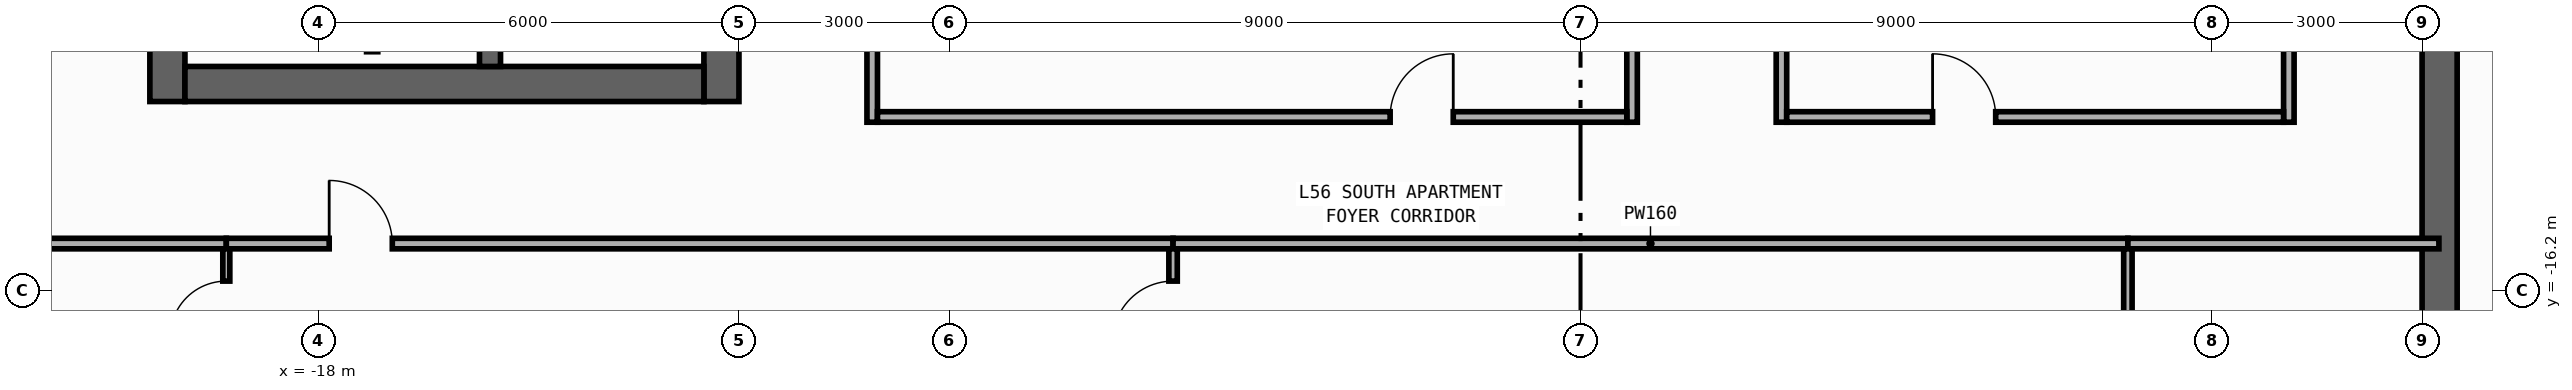
"""IFC4 building model, lengths in metres.
Left out: names, types, materials, properties, quantities, classifications, styles, units other than length and angle.
Written with IfcOpenShell. Run it as: python <this file> out.ifc"""

import sys

from ifc_helpers import new_model, si_unit, direction, frame, frame_2d, origin, place, context, subcontext, project, spatial, rectangle, extrude, element, fill, save


model = new_model("IFC4")
c1 = context("Model", 3, precision=1e-05, world=origin(), true_north=direction((0.0, 1.0)))
c2 = subcontext(c1, "Body", "Model", "MODEL_VIEW")
j1 = project(units=[si_unit("LENGTHUNIT", "METRE"), si_unit("PLANEANGLEUNIT", "RADIAN")], contexts=[c1])
p1 = place(None, origin())
s1 = spatial("IfcSite", under=j1, at=p1, CompositionType="ELEMENT")
p2 = place(p1, origin())
s2 = spatial("IfcBuilding", under=s1, at=p2, CompositionType="ELEMENT")
p3 = place(p2, frame((0.0, 0.0, 240.4)))
s3 = spatial("IfcBuildingStorey", under=s2, at=p3, CompositionType="ELEMENT", Elevation=240.4)
p4 = place(p3, frame((-20.15, -13.5, 0.0), z_axis=(0.0, 0.0, 1.0), x_axis=(0.0, 1.0, 0.0)))
e1 = element("IfcWall", 1, at=p4, inside=s3, PredefinedType="SHEAR", context=c2, shape_type="SweptSolid", body=[
    extrude(rectangle(XDim=27.0, YDim=0.5, at=frame_2d((13.5, 0.0))), origin(), (0.0, 0.0, 1.0), 3.34),
])
p5 = place(p3, frame((-12.25, -13.5, 0.0), z_axis=(0.0, 0.0, 1.0), x_axis=(0.0, 1.0, 0.0)))
e2 = element("IfcWall", 2, at=p5, inside=s3, PredefinedType="SHEAR", context=c2, shape_type="SweptSolid", body=[
    extrude(rectangle(XDim=27.0, YDim=0.5, at=frame_2d((13.5, 0.0))), origin(), (0.0, 0.0, 1.0), 3.34),
])
p6 = place(p5, frame((15.175, 0.0, 0.0)))
e3 = element("IfcOpeningElement", 3, at=p6, cuts=e2, PredefinedType="OPENING", context=c2, shape_type="SweptSolid", body=[
    extrude(rectangle(XDim=0.85, YDim=2.1, at=frame_2d((0.425, 1.05))), frame((0.0, 0.26, 0.0), z_axis=(0.0, -1.0, 0.0), x_axis=(1.0, 0.0, 0.0)), (0.0, 0.0, 1.0), 0.52),
])
p7 = place(p5, frame((21.275, 0.0, 0.0)))
e4 = element("IfcOpeningElement", 4, at=p7, cuts=e2, PredefinedType="OPENING", context=c2, shape_type="SweptSolid", body=[
    extrude(rectangle(XDim=0.85, YDim=2.1, at=frame_2d((0.425, 1.05))), frame((0.0, 0.26, 0.0), z_axis=(0.0, -1.0, 0.0), x_axis=(1.0, 0.0, 0.0)), (0.0, 0.0, 1.0), 0.52),
])
p8 = place(p5, frame((4.275, 0.0, 0.0)))
e5 = element("IfcOpeningElement", 5, at=p8, cuts=e2, PredefinedType="OPENING", context=c2, shape_type="SweptSolid", body=[
    extrude(rectangle(XDim=0.85, YDim=2.1, at=frame_2d((0.425, 1.05))), frame((0.0, 0.26, 0.0), z_axis=(0.0, -1.0, 0.0), x_axis=(1.0, 0.0, 0.0)), (0.0, 0.0, 1.0), 0.52),
])
p9 = place(p5, frame((10.275, 0.0, 0.0)))
e6 = element("IfcOpeningElement", 6, at=p9, cuts=e2, PredefinedType="OPENING", context=c2, shape_type="SweptSolid", body=[
    extrude(rectangle(XDim=0.85, YDim=2.1, at=frame_2d((0.425, 1.05))), frame((0.0, 0.26, 0.0), z_axis=(0.0, -1.0, 0.0), x_axis=(1.0, 0.0, 0.0)), (0.0, 0.0, 1.0), 0.52),
])
p10 = place(p5, frame((12.725, 0.0, 0.0)))
e7 = element("IfcOpeningElement", 7, at=p10, cuts=e2, PredefinedType="OPENING", context=c2, shape_type="SweptSolid", body=[
    extrude(rectangle(XDim=1.15, YDim=2.2, at=frame_2d((0.575, 1.1))), frame((0.0, 0.26, 0.0), z_axis=(0.0, -1.0, 0.0), x_axis=(1.0, 0.0, 0.0)), (0.0, 0.0, 1.0), 0.52),
])
p11 = place(p5, frame((1.625, 0.0, 0.0)))
e8 = element("IfcOpeningElement", 8, at=p11, cuts=e2, PredefinedType="OPENING", context=c2, shape_type="SweptSolid", body=[
    extrude(rectangle(XDim=0.85, YDim=2.1, at=frame_2d((0.425, 1.05))), frame((0.0, 0.26, 0.0), z_axis=(0.0, -1.0, 0.0), x_axis=(1.0, 0.0, 0.0)), (0.0, 0.0, 1.0), 0.52),
])
p12 = place(p3, frame((-19.9, -13.25, 0.0), z_axis=(0.0, 0.0, 1.0), x_axis=(1.0, 0.0, 0.0)))
e9 = element("IfcWall", 9, at=p12, inside=s3, PredefinedType="SHEAR", context=c2, shape_type="SweptSolid", body=[
    extrude(rectangle(XDim=7.4, YDim=0.5, at=frame_2d((3.7, 0.0))), origin(), (0.0, 0.0, 1.0), 3.34),
])
p13 = place(p3, frame((-15.55, -13.0, 0.0), z_axis=(0.0, 0.0, 1.0), x_axis=(0.0, 1.0, 0.0)))
e10 = element("IfcWall", 10, at=p13, inside=s3, PredefinedType="SHEAR", context=c2, shape_type="SweptSolid", body=[
    extrude(rectangle(XDim=26.0, YDim=0.3, at=frame_2d((13.0, 0.0))), origin(), (0.0, 0.0, 1.0), 3.34),
])
p14 = place(p13, frame((12.225, 0.0, 0.0)))
e11 = element("IfcOpeningElement", 11, at=p14, cuts=e10, PredefinedType="OPENING", context=c2, shape_type="SweptSolid", body=[
    extrude(rectangle(XDim=1.15, YDim=2.2, at=frame_2d((0.575, 1.1))), frame((0.0, 0.16, 0.0), z_axis=(0.0, -1.0, 0.0), x_axis=(1.0, 0.0, 0.0)), (0.0, 0.0, 1.0), 0.32),
])
p15 = place(p13, frame((1.125, 0.0, 0.0)))
e12 = element("IfcOpeningElement", 12, at=p15, cuts=e10, PredefinedType="OPENING", context=c2, shape_type="SweptSolid", body=[
    extrude(rectangle(XDim=0.85, YDim=2.1, at=frame_2d((0.425, 1.05))), frame((0.0, 0.16, 0.0), z_axis=(0.0, -1.0, 0.0), x_axis=(1.0, 0.0, 0.0)), (0.0, 0.0, 1.0), 0.32),
])
p16 = place(p3, frame((12.25, -19.8, 0.0), z_axis=(0.0, 0.0, 1.0), x_axis=(0.0, 1.0, 0.0)))
e13 = element("IfcWall", 13, at=p16, inside=s3, PredefinedType="SHEAR", context=c2, shape_type="SweptSolid", body=[
    extrude(rectangle(XDim=27.0, YDim=0.5, at=frame_2d((13.5, 0.0))), origin(), (0.0, 0.0, 1.0), 3.34),
])
p17 = place(p16, frame((23.05, 0.0, 0.0)))
e14 = element("IfcOpeningElement", 14, at=p17, cuts=e13, PredefinedType="OPENING", context=c2, shape_type="SweptSolid", body=[
    extrude(rectangle(XDim=1.1, YDim=2.2, at=frame_2d((0.55, 1.1))), frame((0.0, 0.26, 0.0), z_axis=(0.0, -1.0, 0.0), x_axis=(1.0, 0.0, 0.0)), (0.0, 0.0, 1.0), 0.52),
])
p18 = place(p16, frame((19.85, 0.0, 0.0)))
e15 = element("IfcOpeningElement", 15, at=p18, cuts=e13, PredefinedType="OPENING", context=c2, shape_type="SweptSolid", body=[
    extrude(rectangle(XDim=1.1, YDim=2.2, at=frame_2d((0.55, 1.1))), frame((0.0, 0.26, 0.0), z_axis=(0.0, -1.0, 0.0), x_axis=(1.0, 0.0, 0.0)), (0.0, 0.0, 1.0), 0.52),
])
p19 = place(p16, frame((16.65, 0.0, 0.0)))
e16 = element("IfcOpeningElement", 16, at=p19, cuts=e13, PredefinedType="OPENING", context=c2, shape_type="SweptSolid", body=[
    extrude(rectangle(XDim=1.1, YDim=2.2, at=frame_2d((0.55, 1.1))), frame((0.0, 0.26, 0.0), z_axis=(0.0, -1.0, 0.0), x_axis=(1.0, 0.0, 0.0)), (0.0, 0.0, 1.0), 0.52),
])
p20 = place(p16, frame((7.175, 0.0, 0.0)))
e17 = element("IfcOpeningElement", 17, at=p20, cuts=e13, PredefinedType="OPENING", context=c2, shape_type="SweptSolid", body=[
    extrude(rectangle(XDim=0.85, YDim=2.1, at=frame_2d((0.425, 1.05))), frame((0.0, 0.26, 0.0), z_axis=(0.0, -1.0, 0.0), x_axis=(1.0, 0.0, 0.0)), (0.0, 0.0, 1.0), 0.52),
])
p21 = place(p16, frame((10.375, 0.0, 0.0)))
e18 = element("IfcOpeningElement", 18, at=p21, cuts=e13, PredefinedType="OPENING", context=c2, shape_type="SweptSolid", body=[
    extrude(rectangle(XDim=0.85, YDim=2.1, at=frame_2d((0.425, 1.05))), frame((0.0, 0.26, 0.0), z_axis=(0.0, -1.0, 0.0), x_axis=(1.0, 0.0, 0.0)), (0.0, 0.0, 1.0), 0.52),
])
p22 = place(p16, frame((12.725, 0.0, 0.0)))
e19 = element("IfcOpeningElement", 19, at=p22, cuts=e13, PredefinedType="OPENING", context=c2, shape_type="SweptSolid", body=[
    extrude(rectangle(XDim=1.15, YDim=2.2, at=frame_2d((0.575, 1.1))), frame((0.0, 0.26, 0.0), z_axis=(0.0, -1.0, 0.0), x_axis=(1.0, 0.0, 0.0)), (0.0, 0.0, 1.0), 0.52),
])
p23 = place(p16, frame((25.125, 0.0, 0.0)))
e20 = element("IfcOpeningElement", 20, at=p23, cuts=e13, PredefinedType="OPENING", context=c2, shape_type="SweptSolid", body=[
    extrude(rectangle(XDim=0.85, YDim=2.1, at=frame_2d((0.425, 1.05))), frame((0.0, 0.26, 0.0), z_axis=(0.0, -1.0, 0.0), x_axis=(1.0, 0.0, 0.0)), (0.0, 0.0, 1.0), 0.52),
])
p24 = place(p3, frame((-10.1, -13.795, 0.0), z_axis=(0.0, 0.0, 1.0), x_axis=(0.0, 1.0, 0.0)))
e21 = element("IfcWall", 21, at=p24, inside=s3, PredefinedType="PARTITIONING", context=c2, shape_type="SweptSolid", body=[
    extrude(rectangle(XDim=14.205, YDim=0.15, at=frame_2d((7.103, 0.0))), origin(), (0.0, 0.0, 1.0), 3.34),
])
p25 = place(p24, frame((7.972, 0.0, 0.0)))
e22 = element("IfcOpeningElement", 22, at=p25, cuts=e21, PredefinedType="OPENING", context=c2, shape_type="SweptSolid", body=[
    extrude(rectangle(XDim=0.9, YDim=2.15, at=frame_2d((0.45, 1.075))), frame((0.0, 0.085, 0.0), z_axis=(0.0, -1.0, 0.0), x_axis=(1.0, 0.0, 0.0)), (0.0, 0.0, 1.0), 0.17),
])
p26 = place(p3, frame((10.1, -13.795, 0.0), z_axis=(0.0, 0.0, 1.0), x_axis=(0.0, 1.0, 0.0)))
e23 = element("IfcWall", 23, at=p26, inside=s3, PredefinedType="PARTITIONING", context=c2, shape_type="SweptSolid", body=[
    extrude(rectangle(XDim=11.575, YDim=0.15, at=frame_2d((5.788, 0.0))), origin(), (0.0, 0.0, 1.0), 3.34),
])
p27 = place(p26, frame((7.979, 0.0, 0.0)))
e24 = element("IfcOpeningElement", 24, at=p27, cuts=e23, PredefinedType="OPENING", context=c2, shape_type="SweptSolid", body=[
    extrude(rectangle(XDim=0.9, YDim=2.15, at=frame_2d((0.45, 1.075))), frame((0.0, 0.085, 0.0), z_axis=(0.0, -1.0, 0.0), x_axis=(1.0, 0.0, 0.0)), (0.0, 0.0, 1.0), 0.17),
])
p28 = place(p3, frame((0.735, -13.795, 0.0), z_axis=(0.0, 0.0, 1.0), x_axis=(0.0, 1.0, 0.0)))
e25 = element("IfcWall", 25, at=p28, inside=s3, PredefinedType="PARTITIONING", context=c2, shape_type="SweptSolid", body=[
    extrude(rectangle(XDim=14.055, YDim=0.15, at=frame_2d((7.027, 0.0))), origin(), (0.0, 0.0, 1.0), 3.34),
])
p29 = place(p28, frame((7.881, 0.0, 0.0)))
e26 = element("IfcOpeningElement", 26, at=p29, cuts=e25, PredefinedType="OPENING", context=c2, shape_type="SweptSolid", body=[
    extrude(rectangle(XDim=0.9, YDim=2.15, at=frame_2d((0.45, 1.075))), frame((0.0, 0.085, 0.0), z_axis=(0.0, -1.0, 0.0), x_axis=(1.0, 0.0, 0.0)), (0.0, 0.0, 1.0), 0.17),
])
p30 = place(p3, frame((2.865, -13.795, 0.0), z_axis=(0.0, 0.0, 1.0), x_axis=(0.0, 1.0, 0.0)))
e27 = element("IfcWall", 27, at=p30, inside=s3, PredefinedType="PARTITIONING", context=c2, shape_type="SweptSolid", body=[
    extrude(rectangle(XDim=11.415, YDim=0.15, at=frame_2d((5.708, 0.0))), origin(), (0.0, 0.0, 1.0), 3.34),
])
p31 = place(p30, frame((8.013, 0.0, 0.0)))
e28 = element("IfcOpeningElement", 28, at=p31, cuts=e27, PredefinedType="OPENING", context=c2, shape_type="SweptSolid", body=[
    extrude(rectangle(XDim=0.9, YDim=2.15, at=frame_2d((0.45, 1.075))), frame((0.0, 0.085, 0.0), z_axis=(0.0, -1.0, 0.0), x_axis=(1.0, 0.0, 0.0)), (0.0, 0.0, 1.0), 0.17),
])
p32 = place(p3, frame((-21.955, -15.525, 0.0), z_axis=(0.0, 0.0, 1.0), x_axis=(1.0, 0.0, 0.0)))
e29 = element("IfcWall", 29, at=p32, inside=s3, PredefinedType="PARTITIONING", context=c2, shape_type="SweptSolid", body=[
    extrude(rectangle(XDim=2.645, YDim=0.15, at=frame_2d((1.323, 0.0))), origin(), (0.0, 0.0, 1.0), 3.34),
])
p33 = place(p3, frame((-19.31, -15.525, 0.0), z_axis=(0.0, 0.0, 1.0), x_axis=(1.0, 0.0, 0.0)))
e30 = element("IfcWall", 30, at=p33, inside=s3, PredefinedType="PARTITIONING", context=c2, shape_type="SweptSolid", body=[
    extrude(rectangle(XDim=13.5, YDim=0.15, at=frame_2d((6.75, 0.0))), origin(), (0.0, 0.0, 1.0), 3.34),
])
p34 = place(p33, frame((1.467, 0.0, 0.0)))
e31 = element("IfcOpeningElement", 31, at=p34, cuts=e30, PredefinedType="OPENING", context=c2, shape_type="SweptSolid", body=[
    extrude(rectangle(XDim=0.9, YDim=2.15, at=frame_2d((0.45, 1.075))), frame((0.0, 0.085, 0.0), z_axis=(0.0, -1.0, 0.0), x_axis=(1.0, 0.0, 0.0)), (0.0, 0.0, 1.0), 0.17),
])
p35 = place(p3, frame((-5.81, -15.525, 0.0), z_axis=(0.0, 0.0, 1.0), x_axis=(1.0, 0.0, 0.0)))
e32 = element("IfcWall", 32, at=p35, inside=s3, PredefinedType="PARTITIONING", context=c2, shape_type="SweptSolid", body=[
    extrude(rectangle(XDim=13.615, YDim=0.15, at=frame_2d((6.808, 0.0))), origin(), (0.0, 0.0, 1.0), 3.34),
])
p36 = place(p3, frame((7.805, -15.525, 0.0), z_axis=(0.0, 0.0, 1.0), x_axis=(1.0, 0.0, 0.0)))
e33 = element("IfcWall", 33, at=p36, inside=s3, PredefinedType="PARTITIONING", context=c2, shape_type="SweptSolid", body=[
    extrude(rectangle(XDim=4.435, YDim=0.15, at=frame_2d((2.218, 0.0))), origin(), (0.0, 0.0, 1.0), 3.34),
])
p37 = place(p3, frame((-10.025, -13.72, 0.0), z_axis=(0.0, 0.0, 1.0), x_axis=(1.0, 0.0, 0.0)))
e34 = element("IfcWall", 34, at=p37, inside=s3, PredefinedType="PARTITIONING", context=c2, shape_type="SweptSolid", body=[
    extrude(rectangle(XDim=10.685, YDim=0.15, at=frame_2d((5.342, 0.0))), origin(), (0.0, 0.0, 1.0), 3.34),
])
p38 = place(p37, frame((7.31, 0.0, 0.0)))
e35 = element("IfcOpeningElement", 35, at=p38, cuts=e34, PredefinedType="OPENING", context=c2, shape_type="SweptSolid", body=[
    extrude(rectangle(XDim=0.9, YDim=2.15, at=frame_2d((0.45, 1.075))), frame((0.0, 0.085, 0.0), z_axis=(0.0, -1.0, 0.0), x_axis=(1.0, 0.0, 0.0)), (0.0, 0.0, 1.0), 0.17),
])
p39 = place(p3, frame((2.94, -13.72, 0.0), z_axis=(0.0, 0.0, 1.0), x_axis=(1.0, 0.0, 0.0)))
e36 = element("IfcWall", 36, at=p39, inside=s3, PredefinedType="PARTITIONING", context=c2, shape_type="SweptSolid", body=[
    extrude(rectangle(XDim=7.085, YDim=0.15, at=frame_2d((3.542, 0.0))), origin(), (0.0, 0.0, 1.0), 3.34),
])
p40 = place(p39, frame((2.08, 0.0, 0.0)))
e37 = element("IfcOpeningElement", 37, at=p40, cuts=e36, PredefinedType="OPENING", context=c2, shape_type="SweptSolid", body=[
    extrude(rectangle(XDim=0.9, YDim=2.15, at=frame_2d((0.45, 1.075))), frame((0.0, 0.085, 0.0), z_axis=(0.0, -1.0, 0.0), x_axis=(1.0, 0.0, 0.0)), (0.0, 0.0, 1.0), 0.17),
])
p41 = place(p3, frame((-19.31, -18.1, 0.0), z_axis=(0.0, 0.0, 1.0), x_axis=(0.0, 1.0, 0.0)))
e38 = element("IfcWall", 38, at=p41, inside=s3, PredefinedType="PARTITIONING", context=c2, shape_type="SweptSolid", body=[
    extrude(rectangle(XDim=2.5, YDim=0.1, at=frame_2d((1.25, 0.0))), origin(), (0.0, 0.0, 1.0), 3.34),
])
p42 = place(p41, frame((1.24, 0.0, 0.0)))
e39 = element("IfcOpeningElement", 39, at=p42, cuts=e38, PredefinedType="OPENING", context=c2, shape_type="SweptSolid", body=[
    extrude(rectangle(XDim=0.8, YDim=2.1, at=frame_2d((0.4, 1.05))), frame((0.0, 0.06, 0.0), z_axis=(0.0, -1.0, 0.0), x_axis=(1.0, 0.0, 0.0)), (0.0, 0.0, 1.0), 0.12),
])
p43 = place(p3, frame((-5.81, -20.1, 0.0), z_axis=(0.0, 0.0, 1.0), x_axis=(0.0, 1.0, 0.0)))
e40 = element("IfcWall", 40, at=p43, inside=s3, PredefinedType="PARTITIONING", context=c2, shape_type="SweptSolid", body=[
    extrude(rectangle(XDim=4.5, YDim=0.12, at=frame_2d((2.25, 0.0))), origin(), (0.0, 0.0, 1.0), 3.34),
])
p44 = place(p43, frame((3.18, 0.0, 0.0)))
e41 = element("IfcOpeningElement", 41, at=p44, cuts=e40, PredefinedType="OPENING", context=c2, shape_type="SweptSolid", body=[
    extrude(rectangle(XDim=0.86, YDim=2.15, at=frame_2d((0.43, 1.075))), frame((0.0, 0.07, 0.0), z_axis=(0.0, -1.0, 0.0), x_axis=(1.0, 0.0, 0.0)), (0.0, 0.0, 1.0), 0.14),
])
p45 = place(p3, frame((7.805, -24.735, 0.0), z_axis=(0.0, 0.0, 1.0), x_axis=(0.0, 1.0, 0.0)))
e42 = element("IfcWall", 42, at=p45, inside=s3, PredefinedType="PARTITIONING", context=c2, shape_type="SweptSolid", body=[
    extrude(rectangle(XDim=9.135, YDim=0.12, at=frame_2d((4.568, 0.0))), origin(), (0.0, 0.0, 1.0), 3.34),
])
p46 = place(p45, frame((0.46, 0.0, 0.0)))
e43 = element("IfcOpeningElement", 43, at=p46, cuts=e42, PredefinedType="OPENING", context=c2, shape_type="SweptSolid", body=[
    extrude(rectangle(XDim=0.8, YDim=2.1, at=frame_2d((0.4, 1.05))), frame((0.0, 0.07, 0.0), z_axis=(0.0, -1.0, 0.0), x_axis=(1.0, 0.0, 0.0)), (0.0, 0.0, 1.0), 0.14),
])
p47 = place(p34, origin())
e44 = element("IfcDoor", 44, at=p47, inside=s3, OperationType="SINGLE_SWING_LEFT", PredefinedType="DOOR", context=c2, shape_type="SweptSolid", body=[
    extrude(rectangle(XDim=0.9, YDim=2.15, at=frame_2d((0.45, 1.075))), frame((0.0, 0.025, 0.0), z_axis=(0.0, -1.0, 0.0), x_axis=(1.0, 0.0, 0.0)), (0.0, 0.0, 1.0), 0.05),
])
fill(e31, e44)
p48 = place(p38, origin())
e45 = element("IfcDoor", 45, at=p48, inside=s3, OperationType="SINGLE_SWING_RIGHT", PredefinedType="DOOR", context=c2, shape_type="SweptSolid", body=[
    extrude(rectangle(XDim=0.9, YDim=2.15, at=frame_2d((0.45, 1.075))), frame((0.0, 0.025, 0.0), z_axis=(0.0, -1.0, 0.0), x_axis=(1.0, 0.0, 0.0)), (0.0, 0.0, 1.0), 0.05),
])
fill(e35, e45)
p49 = place(p40, origin())
e46 = element("IfcDoor", 46, at=p49, inside=s3, OperationType="SINGLE_SWING_LEFT", PredefinedType="DOOR", context=c2, shape_type="SweptSolid", body=[
    extrude(rectangle(XDim=0.9, YDim=2.15, at=frame_2d((0.45, 1.075))), frame((0.0, 0.025, 0.0), z_axis=(0.0, -1.0, 0.0), x_axis=(1.0, 0.0, 0.0)), (0.0, 0.0, 1.0), 0.05),
])
fill(e37, e46)
p50 = place(p42, origin())
e47 = element("IfcDoor", 47, at=p50, inside=s3, OperationType="SINGLE_SWING_LEFT", PredefinedType="DOOR", context=c2, shape_type="SweptSolid", body=[
    extrude(rectangle(XDim=0.8, YDim=2.1, at=frame_2d((0.4, 1.05))), frame((0.0, 0.025, 0.0), z_axis=(0.0, -1.0, 0.0), x_axis=(1.0, 0.0, 0.0)), (0.0, 0.0, 1.0), 0.05),
])
fill(e39, e47)
p51 = place(p44, origin())
e48 = element("IfcDoor", 48, at=p51, inside=s3, OperationType="SINGLE_SWING_LEFT", PredefinedType="DOOR", context=c2, shape_type="SweptSolid", body=[
    extrude(rectangle(XDim=0.86, YDim=2.15, at=frame_2d((0.43, 1.075))), frame((0.0, 0.025, 0.0), z_axis=(0.0, -1.0, 0.0), x_axis=(1.0, 0.0, 0.0)), (0.0, 0.0, 1.0), 0.05),
])
fill(e41, e48)
save(model, sys.argv[1])
